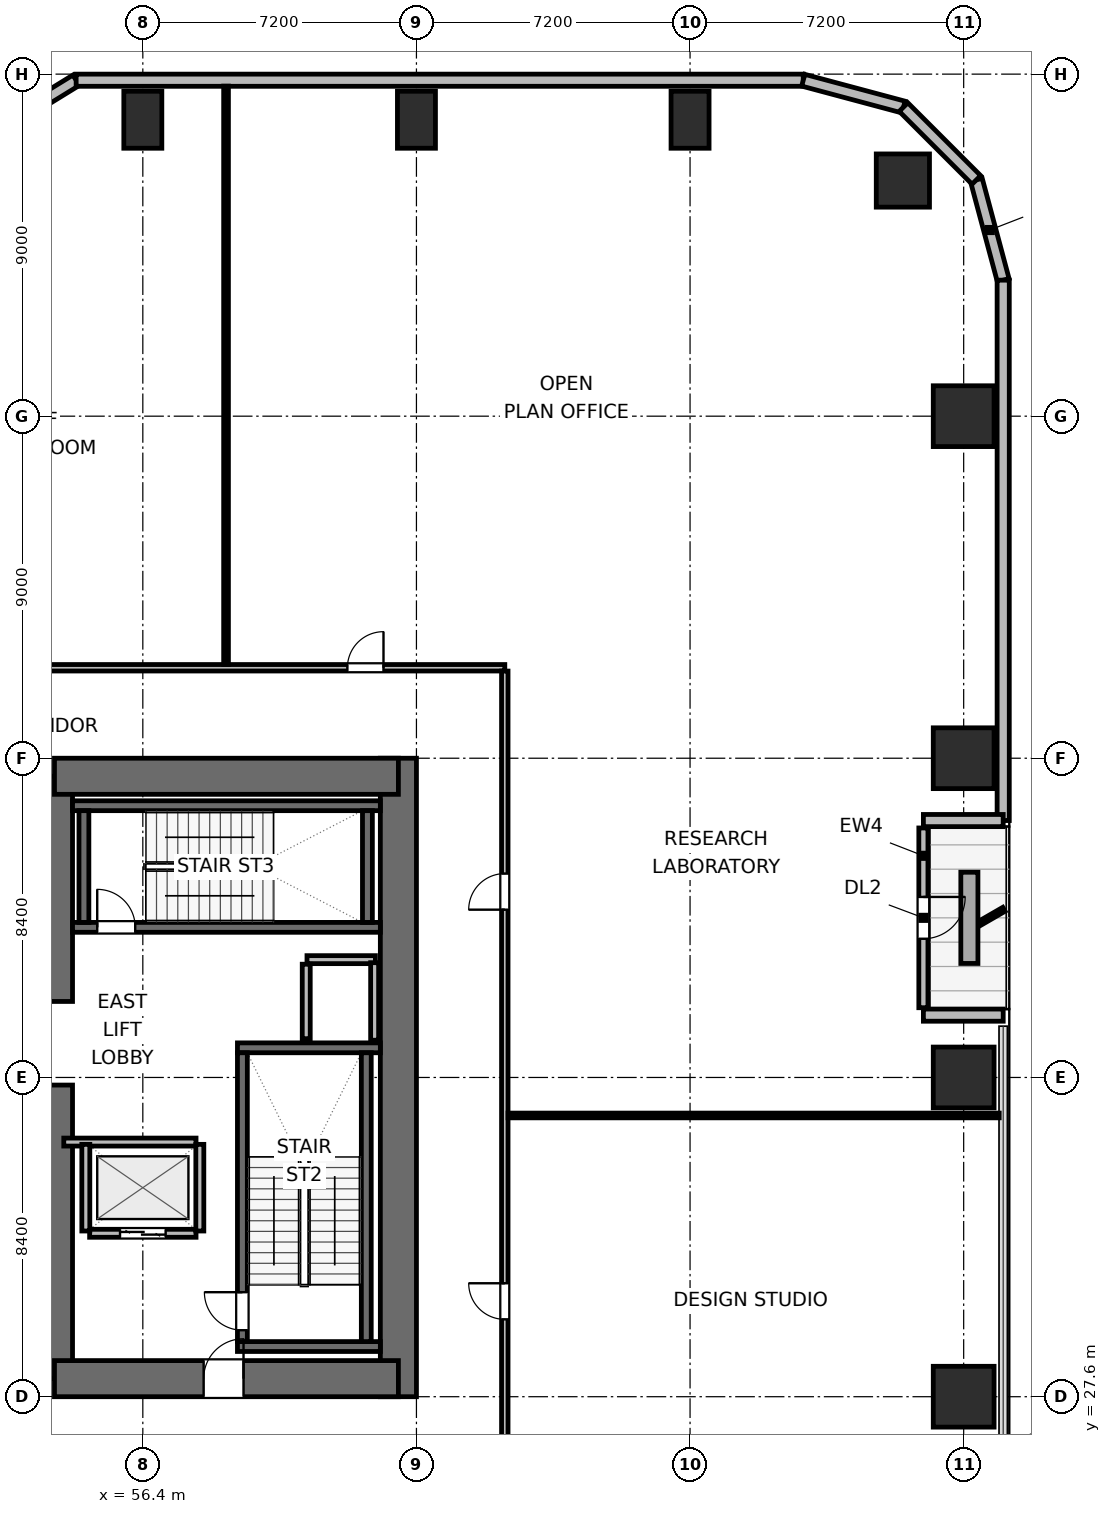
"""IFC4 building model, lengths in metres.
Left out: names, types, materials, properties, quantities, classifications, styles, units other than length and angle.
Written with IfcOpenShell. Run it as: python <this file> out.ifc"""

import sys

from ifc_helpers import new_model, si_unit, direction, frame, frame_2d, origin, origin_2d, place, context, subcontext, project, spatial, rectangle, circle, extrude, element, fill, save


model = new_model("IFC4")
c1 = context("Model", 3, precision=1e-05, world=origin(), true_north=direction((0.0, 1.0)))
c2 = subcontext(c1, "Body", "Model", "MODEL_VIEW")
j1 = project(units=[si_unit("LENGTHUNIT", "METRE"), si_unit("PLANEANGLEUNIT", "RADIAN")], contexts=[c1])
p1 = place(None, origin())
s1 = spatial("IfcSite", under=j1, at=p1, CompositionType="ELEMENT")
p2 = place(p1, origin())
s2 = spatial("IfcBuilding", under=s1, at=p2, CompositionType="ELEMENT")
p3 = place(p2, frame((0.0, 0.0, 68.4)))
s3 = spatial("IfcBuildingStorey", under=s2, at=p3, CompositionType="ELEMENT", Elevation=68.4)
p4 = place(p3, frame((54.075, 28.075, 0.0), z_axis=(0.0, 0.0, 1.0), x_axis=(0.0, 1.0, 0.0)))
e1 = element("IfcWall", 1, at=p4, inside=s3, PredefinedType="SHEAR", context=c2, shape_type="SweptSolid", body=[
    extrude(rectangle(XDim=7.725, YDim=0.95, at=frame_2d((3.863, 0.0))), origin(), (0.0, 0.0, 1.0), 4.5),
])
p5 = place(p3, frame((54.075, 38.0, 0.0), z_axis=(0.0, 0.0, 1.0), x_axis=(0.0, 1.0, 0.0)))
e2 = element("IfcWall", 2, at=p5, inside=s3, PredefinedType="SHEAR", context=c2, shape_type="SweptSolid", body=[
    extrude(rectangle(XDim=5.925, YDim=0.95, at=frame_2d((2.962, 0.0))), origin(), (0.0, 0.0, 1.0), 4.5),
])
p6 = place(p3, frame((63.125, 27.6, 0.0), z_axis=(0.0, 0.0, 1.0), x_axis=(0.0, 1.0, 0.0)))
e3 = element("IfcWall", 3, at=p6, inside=s3, PredefinedType="SHEAR", context=c2, shape_type="SweptSolid", body=[
    extrude(rectangle(XDim=16.8, YDim=0.95, at=frame_2d((8.4, 0.0))), origin(), (0.0, 0.0, 1.0), 4.5),
])
p7 = place(p3, frame((54.075, 28.075, 0.0), z_axis=(0.0, 0.0, 1.0), x_axis=(1.0, 0.0, 0.0)))
e4 = element("IfcWall", 4, at=p7, inside=s3, PredefinedType="SHEAR", context=c2, shape_type="SweptSolid", body=[
    extrude(rectangle(XDim=9.05, YDim=0.95, at=frame_2d((4.525, 0.0))), origin(), (0.0, 0.0, 1.0), 4.5),
])
p8 = place(p7, frame((3.925, 0.0, 0.0)))
e5 = element("IfcOpeningElement", 5, at=p8, cuts=e4, PredefinedType="OPENING", context=c2, shape_type="SweptSolid", body=[
    extrude(rectangle(XDim=1.05, YDim=2.04, at=frame_2d((0.525, 1.02))), frame((0.0, 0.485, 0.0), z_axis=(0.0, -1.0, 0.0), x_axis=(1.0, 0.0, 0.0)), (0.0, 0.0, 1.0), 0.97),
])
p9 = place(p3, frame((54.075, 43.925, 0.0), z_axis=(0.0, 0.0, 1.0), x_axis=(1.0, 0.0, 0.0)))
e6 = element("IfcWall", 6, at=p9, inside=s3, PredefinedType="SHEAR", context=c2, shape_type="SweptSolid", body=[
    extrude(rectangle(XDim=9.05, YDim=0.95, at=frame_2d((4.525, 0.0))), origin(), (0.0, 0.0, 1.0), 4.5),
])
for number, where, z_axis, x_axis in (
    (7, (58.89, 28.92, 0.0), (0.0, 0.0, 1.0), (1.0, 0.0, 0.0)),
    (8, (58.89, 36.78, 0.0), (0.0, 0.0, 1.0), (1.0, 0.0, 0.0)),
):
    element("IfcWall", number, at=place(p3, frame(where, z_axis=z_axis, x_axis=x_axis)), inside=s3, PredefinedType="SHEAR", context=c2, shape_type="SweptSolid", body=[
        extrude(rectangle(XDim=3.76, YDim=0.26, at=frame_2d((1.88, 0.0))), origin(), (0.0, 0.0, 1.0), 4.5),
    ])
p10 = place(p3, frame((59.02, 29.05, 0.0), z_axis=(0.0, 0.0, 1.0), x_axis=(0.0, 1.0, 0.0)))
e9 = element("IfcWall", 9, at=p10, inside=s3, PredefinedType="SHEAR", context=c2, shape_type="SweptSolid", body=[
    extrude(rectangle(XDim=7.6, YDim=0.26, at=frame_2d((3.8, 0.0))), origin(), (0.0, 0.0, 1.0), 4.5),
])
p11 = place(p10, frame((0.3, 0.0, 0.0)))
e10 = element("IfcOpeningElement", 10, at=p11, cuts=e9, PredefinedType="OPENING", context=c2, shape_type="SweptSolid", body=[
    extrude(rectangle(XDim=1.0, YDim=2.04, at=frame_2d((0.5, 1.02))), frame((0.0, 0.14, 0.0), z_axis=(0.0, -1.0, 0.0), x_axis=(1.0, 0.0, 0.0)), (0.0, 0.0, 1.0), 0.28),
])
p12 = place(p3, frame((62.28, 29.05, 0.0), z_axis=(0.0, 0.0, 1.0), x_axis=(0.0, 1.0, 0.0)))
e11 = element("IfcWall", 11, at=p12, inside=s3, PredefinedType="SHEAR", context=c2, shape_type="SweptSolid", body=[
    extrude(rectangle(XDim=7.6, YDim=0.26, at=frame_2d((3.8, 0.0))), origin(), (0.0, 0.0, 1.0), 4.5),
])
p13 = place(p3, frame((54.55, 39.95, 0.0), z_axis=(0.0, 0.0, 1.0), x_axis=(1.0, 0.0, 0.0)))
e12 = element("IfcWall", 12, at=p13, inside=s3, PredefinedType="SHEAR", context=c2, shape_type="SweptSolid", body=[
    extrude(rectangle(XDim=8.1, YDim=0.26, at=frame_2d((4.05, 0.0))), origin(), (0.0, 0.0, 1.0), 4.5),
])
p14 = place(p13, frame((0.65, 0.0, 0.0)))
e13 = element("IfcOpeningElement", 13, at=p14, cuts=e12, PredefinedType="OPENING", context=c2, shape_type="SweptSolid", body=[
    extrude(rectangle(XDim=1.0, YDim=2.04, at=frame_2d((0.5, 1.02))), frame((0.0, 0.14, 0.0), z_axis=(0.0, -1.0, 0.0), x_axis=(1.0, 0.0, 0.0)), (0.0, 0.0, 1.0), 0.28),
])
p15 = place(p3, frame((54.55, 43.15, 0.0), z_axis=(0.0, 0.0, 1.0), x_axis=(1.0, 0.0, 0.0)))
e14 = element("IfcWall", 14, at=p15, inside=s3, PredefinedType="SHEAR", context=c2, shape_type="SweptSolid", body=[
    extrude(rectangle(XDim=8.1, YDim=0.26, at=frame_2d((4.05, 0.0))), origin(), (0.0, 0.0, 1.0), 4.5),
])
for number, where, z_axis, x_axis in (
    (15, (54.85, 40.08, 0.0), (0.0, 0.0, 1.0), (0.0, 1.0, 0.0)),
    (16, (62.31, 40.08, 0.0), (0.0, 0.0, 1.0), (0.0, 1.0, 0.0)),
):
    element("IfcWall", number, at=place(p3, frame(where, z_axis=z_axis, x_axis=x_axis)), inside=s3, PredefinedType="SHEAR", context=c2, shape_type="SweptSolid", body=[
        extrude(rectangle(XDim=2.94, YDim=0.26, at=frame_2d((1.47, 0.0))), origin(), (0.0, 0.0, 1.0), 4.5),
    ])
p16 = place(p3, frame((76.4, 59.6, 0.0), z_axis=(0.0, 0.0, 1.0), x_axis=(1.0, 0.0, 0.0)))
e17 = element("IfcColumn", 17, at=p16, inside=s3, PredefinedType="COLUMN", context=c2, shape_type="SweptSolid", body=[
    extrude(circle(Radius=0.7, at=origin_2d()), origin(), (0.0, 0.0, 1.0), 4.5),
])
for number, where, z_axis, x_axis in (
    (18, (56.4, 61.2, 0.0), (0.0, 0.0, 1.0), (1.0, 0.0, 0.0)),
    (19, (63.6, 61.2, 0.0), (0.0, 0.0, 1.0), (1.0, 0.0, 0.0)),
    (20, (70.8, 61.2, 0.0), (0.0, 0.0, 1.0), (1.0, 0.0, 0.0)),
):
    element("IfcColumn", number, at=place(p3, frame(where, z_axis=z_axis, x_axis=x_axis)), inside=s3, PredefinedType="COLUMN", context=c2, shape_type="SweptSolid", body=[
        extrude(rectangle(XDim=1.0, YDim=1.5, at=origin_2d()), origin(), (0.0, 0.0, 1.0), 4.5),
    ])
for number, where, z_axis, x_axis in (
    (21, (78.0, 27.6, 0.0), (0.0, 0.0, 1.0), (1.0, 0.0, 0.0)),
    (22, (78.0, 36.0, 0.0), (0.0, 0.0, 1.0), (1.0, 0.0, 0.0)),
    (23, (78.0, 44.4, 0.0), (0.0, 0.0, 1.0), (1.0, 0.0, 0.0)),
    (24, (78.0, 53.4, 0.0), (0.0, 0.0, 1.0), (1.0, 0.0, 0.0)),
):
    element("IfcColumn", number, at=place(p3, frame(where, z_axis=z_axis, x_axis=x_axis)), inside=s3, PredefinedType="COLUMN", context=c2, shape_type="SweptSolid", body=[
        extrude(rectangle(XDim=1.6, YDim=1.6, at=origin_2d()), origin(), (0.0, 0.0, 1.0), 4.5),
    ])
p17 = place(p3, frame((78.333, 59.617, 0.0), z_axis=(0.0, 0.0, 1.0), x_axis=(0.25869736047, -0.965958423373, 0.0)))
e25 = element("IfcWall", 25, at=p17, inside=s3, PredefinedType="SOLIDWALL", context=c2, shape_type="SweptSolid", body=[
    extrude(rectangle(XDim=2.731, YDim=0.32, at=frame_2d((1.366, 0.0))), origin(), (0.0, 0.0, 1.0), 4.24),
])
p18 = place(p3, frame((79.04, 56.979, 0.0), z_axis=(0.0, 0.0, 1.0), x_axis=(0.0, -1.0, 0.0)))
e26 = element("IfcWall", 26, at=p18, inside=s3, PredefinedType="SOLIDWALL", context=c2, shape_type="SweptSolid", body=[
    extrude(rectangle(XDim=14.219, YDim=0.32, at=frame_2d((7.109, 0.0))), origin(), (0.0, 0.0, 1.0), 4.24),
])
p19 = place(p3, frame((79.04, 42.76, 0.0), z_axis=(0.0, 0.0, 1.0), x_axis=(-1.0, 0.0, 0.0)))
e27 = element("IfcWall", 27, at=p19, inside=s3, PredefinedType="SOLIDWALL", context=c2, shape_type="SweptSolid", body=[
    extrude(rectangle(XDim=2.1, YDim=0.32, at=frame_2d((1.05, 0.0))), origin(), (0.0, 0.0, 1.0), 3.475),
])
p20 = place(p3, frame((76.94, 42.565, 0.0), z_axis=(0.0, 0.0, 1.0), x_axis=(0.0, -1.0, 0.0)))
e28 = element("IfcWall", 28, at=p20, inside=s3, PredefinedType="SOLIDWALL", context=c2, shape_type="SweptSolid", body=[
    extrude(rectangle(XDim=4.73, YDim=0.24, at=frame_2d((2.365, 0.0))), origin(), (0.0, 0.0, 1.0), 3.762),
])
p21 = place(p20, frame((1.815, 0.0, 0.0)))
e29 = element("IfcOpeningElement", 29, at=p21, cuts=e28, PredefinedType="OPENING", context=c2, shape_type="SweptSolid", body=[
    extrude(rectangle(XDim=1.1, YDim=2.04, at=frame_2d((0.55, 1.02))), frame((0.0, 0.13, 0.0), z_axis=(0.0, -1.0, 0.0), x_axis=(1.0, 0.0, 0.0)), (0.0, 0.0, 1.0), 0.26),
])
p22 = place(p3, frame((76.94, 37.64, 0.0), z_axis=(0.0, 0.0, 1.0), x_axis=(1.0, 0.0, 0.0)))
e30 = element("IfcWall", 30, at=p22, inside=s3, PredefinedType="SOLIDWALL", context=c2, shape_type="SweptSolid", body=[
    extrude(rectangle(XDim=2.1, YDim=0.32, at=frame_2d((1.05, 0.0))), origin(), (0.0, 0.0, 1.0), 3.475),
])
p23 = place(p3, frame((53.56, 61.573, 0.0), z_axis=(0.0, 0.0, 1.0), x_axis=(0.851776724646, 0.523904964045, 0.0)))
e31 = element("IfcWall", 31, at=p23, inside=s3, PredefinedType="SOLIDWALL", context=c2, shape_type="SweptSolid", body=[
    extrude(rectangle(XDim=1.274, YDim=0.32, at=frame_2d((0.637, 0.0))), origin(), (0.0, 0.0, 1.0), 4.24),
])
p24 = place(p3, frame((54.645, 62.24, 0.0), z_axis=(0.0, 0.0, 1.0), x_axis=(1.0, 0.0, 0.0)))
e32 = element("IfcWall", 32, at=p24, inside=s3, PredefinedType="SOLIDWALL", context=c2, shape_type="SweptSolid", body=[
    extrude(rectangle(XDim=19.134, YDim=0.32, at=frame_2d((9.567, 0.0))), origin(), (0.0, 0.0, 1.0), 4.24),
])
p25 = place(p3, frame((73.779, 62.24, 0.0), z_axis=(0.0, 0.0, 1.0), x_axis=(0.965964405026, -0.25867502435, 0.0)))
e33 = element("IfcWall", 33, at=p25, inside=s3, PredefinedType="SOLIDWALL", context=c2, shape_type="SweptSolid", body=[
    extrude(rectangle(XDim=2.731, YDim=0.32, at=frame_2d((1.366, 0.0))), origin(), (0.0, 0.0, 1.0), 4.24),
])
p26 = place(p3, frame((76.417, 61.533, 0.0), z_axis=(0.0, 0.0, 1.0), x_axis=(0.707106781187, -0.707106781187, 0.0)))
e34 = element("IfcWall", 34, at=p26, inside=s3, PredefinedType="SOLIDWALL", context=c2, shape_type="SweptSolid", body=[
    extrude(rectangle(XDim=2.71, YDim=0.32, at=frame_2d((1.355, 0.0))), origin(), (0.0, 0.0, 1.0), 4.24),
])
p27 = place(p3, frame((60.72, 39.1, 0.0), z_axis=(0.0, 0.0, 1.0), x_axis=(1.0, 0.0, 0.0)))
e35 = element("IfcWall", 35, at=p27, inside=s3, PredefinedType="PARTITIONING", context=c2, shape_type="SweptSolid", body=[
    extrude(rectangle(XDim=1.8, YDim=0.21, at=frame_2d((0.9, 0.0))), origin(), (0.0, 0.0, 1.0), 4.24),
])
p28 = place(p3, frame((60.7, 37.02, 0.0), z_axis=(0.0, 0.0, 1.0), x_axis=(0.0, 1.0, 0.0)))
e36 = element("IfcWall", 36, at=p28, inside=s3, PredefinedType="PARTITIONING", context=c2, shape_type="SweptSolid", body=[
    extrude(rectangle(XDim=1.96, YDim=0.21, at=frame_2d((0.98, 0.0))), origin(), (0.0, 0.0, 1.0), 4.24),
])
p29 = place(p3, frame((62.5, 36.98, 0.0), z_axis=(0.0, 0.0, 1.0), x_axis=(0.0, 1.0, 0.0)))
e37 = element("IfcWall", 37, at=p29, inside=s3, PredefinedType="PARTITIONING", context=c2, shape_type="SweptSolid", body=[
    extrude(rectangle(XDim=2.04, YDim=0.21, at=frame_2d((1.02, 0.0))), origin(), (0.0, 0.0, 1.0), 4.24),
])
p30 = place(p3, frame((55.0, 31.9, 0.0), z_axis=(0.0, 0.0, 1.0), x_axis=(1.0, 0.0, 0.0)))
e38 = element("IfcWall", 38, at=p30, inside=s3, PredefinedType="PARTITIONING", context=c2, shape_type="SweptSolid", body=[
    extrude(rectangle(XDim=2.8, YDim=0.21, at=frame_2d((1.4, 0.0))), origin(), (0.0, 0.0, 1.0), 4.24),
])
p31 = place(p30, frame((0.8, 0.0, 0.0)))
e39 = element("IfcOpeningElement", 39, at=p31, cuts=e38, PredefinedType="OPENING", context=c2, shape_type="SweptSolid", body=[
    extrude(rectangle(XDim=1.2, YDim=2.04, at=frame_2d((0.6, 1.02))), frame((0.0, 0.115, 0.0), z_axis=(0.0, -1.0, 0.0), x_axis=(1.0, 0.0, 0.0)), (0.0, 0.0, 1.0), 0.23),
])
p32 = place(p3, frame((54.32, 34.3, 0.0), z_axis=(0.0, 0.0, 1.0), x_axis=(1.0, 0.0, 0.0)))
e40 = element("IfcWall", 40, at=p32, inside=s3, PredefinedType="PARTITIONING", context=c2, shape_type="SweptSolid", body=[
    extrude(rectangle(XDim=3.48, YDim=0.21, at=frame_2d((1.74, 0.0))), origin(), (0.0, 0.0, 1.0), 4.24),
])
for number, where, z_axis, x_axis in (
    (41, (54.9, 31.96, 0.0), (0.0, 0.0, 1.0), (0.0, 1.0, 0.0)),
    (42, (57.9, 31.96, 0.0), (0.0, 0.0, 1.0), (0.0, 1.0, 0.0)),
):
    element("IfcWall", number, at=place(p3, frame(where, z_axis=z_axis, x_axis=x_axis)), inside=s3, PredefinedType="PARTITIONING", context=c2, shape_type="SweptSolid", body=[
        extrude(rectangle(XDim=2.28, YDim=0.21, at=frame_2d((1.14, 0.0))), origin(), (0.0, 0.0, 1.0), 4.24),
    ])
p33 = place(p3, frame((30.075, 46.78, 0.0), z_axis=(0.0, 0.0, 1.0), x_axis=(1.0, 0.0, 0.0)))
e43 = element("IfcWall", 43, at=p33, inside=s3, PredefinedType="PARTITIONING", context=c2, shape_type="SweptSolid", body=[
    extrude(rectangle(XDim=35.85, YDim=0.17, at=frame_2d((17.925, 0.0))), origin(), (0.0, 0.0, 1.0), 4.24),
])
p34 = place(p33, frame((6.263, 0.0, 0.0)))
e44 = element("IfcOpeningElement", 44, at=p34, cuts=e43, PredefinedType="OPENING", context=c2, shape_type="SweptSolid", body=[
    extrude(rectangle(XDim=0.95, YDim=2.04, at=frame_2d((0.475, 1.02))), frame((0.0, 0.095, 0.0), z_axis=(0.0, -1.0, 0.0), x_axis=(1.0, 0.0, 0.0)), (0.0, 0.0, 1.0), 0.19),
])
p35 = place(p33, frame((20.52, 0.0, 0.0)))
e45 = element("IfcOpeningElement", 45, at=p35, cuts=e43, PredefinedType="OPENING", context=c2, shape_type="SweptSolid", body=[
    extrude(rectangle(XDim=0.95, YDim=2.04, at=frame_2d((0.475, 1.02))), frame((0.0, 0.095, 0.0), z_axis=(0.0, -1.0, 0.0), x_axis=(1.0, 0.0, 0.0)), (0.0, 0.0, 1.0), 0.19),
])
p36 = place(p33, frame((31.708, 0.0, 0.0)))
e46 = element("IfcOpeningElement", 46, at=p36, cuts=e43, PredefinedType="OPENING", context=c2, shape_type="SweptSolid", body=[
    extrude(rectangle(XDim=0.95, YDim=2.04, at=frame_2d((0.475, 1.02))), frame((0.0, 0.095, 0.0), z_axis=(0.0, -1.0, 0.0), x_axis=(1.0, 0.0, 0.0)), (0.0, 0.0, 1.0), 0.19),
])
p37 = place(p3, frame((65.925, 25.307, 0.0), z_axis=(0.0, 0.0, 1.0), x_axis=(0.0, 1.0, 0.0)))
e47 = element("IfcWall", 47, at=p37, inside=s3, PredefinedType="PARTITIONING", context=c2, shape_type="SweptSolid", body=[
    extrude(rectangle(XDim=21.386, YDim=0.17, at=frame_2d((10.693, 0.0))), origin(), (0.0, 0.0, 1.0), 4.24),
])
p38 = place(p37, frame((4.328, 0.0, 0.0)))
e48 = element("IfcOpeningElement", 48, at=p38, cuts=e47, PredefinedType="OPENING", context=c2, shape_type="SweptSolid", body=[
    extrude(rectangle(XDim=0.95, YDim=2.04, at=frame_2d((0.475, 1.02))), frame((0.0, 0.095, 0.0), z_axis=(0.0, -1.0, 0.0), x_axis=(1.0, 0.0, 0.0)), (0.0, 0.0, 1.0), 0.19),
])
p39 = place(p37, frame((15.108, 0.0, 0.0)))
e49 = element("IfcOpeningElement", 49, at=p39, cuts=e47, PredefinedType="OPENING", context=c2, shape_type="SweptSolid", body=[
    extrude(rectangle(XDim=0.95, YDim=2.04, at=frame_2d((0.475, 1.02))), frame((0.0, 0.095, 0.0), z_axis=(0.0, -1.0, 0.0), x_axis=(1.0, 0.0, 0.0)), (0.0, 0.0, 1.0), 0.19),
])
p40 = place(p3, frame((58.59, 46.867, 0.0), z_axis=(0.0, 0.0, 1.0), x_axis=(0.0, 1.0, 0.0)))
e50 = element("IfcWall", 50, at=p40, inside=s3, PredefinedType="PARTITIONING", context=c2, shape_type="SweptSolid", body=[
    extrude(rectangle(XDim=15.218, YDim=0.125, at=frame_2d((7.609, 0.0))), origin(), (0.0, 0.0, 1.0), 4.24),
])
p41 = place(p3, frame((66.012, 35.0, 0.0), z_axis=(0.0, 0.0, 1.0), x_axis=(1.0, 0.0, 0.0)))
e51 = element("IfcWall", 51, at=p41, inside=s3, PredefinedType="PARTITIONING", context=c2, shape_type="SweptSolid", body=[
    extrude(rectangle(XDim=12.923, YDim=0.125, at=frame_2d((6.461, 0.0))), origin(), (0.0, 0.0, 1.0), 4.24),
])
p42 = place(p21, origin())
e52 = element("IfcDoor", 52, at=p42, inside=s3, OperationType="SINGLE_SWING_LEFT", PredefinedType="DOOR", context=c2, shape_type="SweptSolid", body=[
    extrude(rectangle(XDim=1.1, YDim=2.04, at=frame_2d((0.55, 1.02))), frame((0.0, 0.025, 0.0), z_axis=(0.0, -1.0, 0.0), x_axis=(1.0, 0.0, 0.0)), (0.0, 0.0, 1.0), 0.05),
])
fill(e29, e52)
p43 = place(p11, origin())
e53 = element("IfcDoor", 53, at=p43, inside=s3, OperationType="SINGLE_SWING_RIGHT", PredefinedType="DOOR", context=c2, shape_type="SweptSolid", body=[
    extrude(rectangle(XDim=1.0, YDim=2.04, at=frame_2d((0.5, 1.02))), frame((0.0, 0.025, 0.0), z_axis=(0.0, -1.0, 0.0), x_axis=(1.0, 0.0, 0.0)), (0.0, 0.0, 1.0), 0.05),
])
fill(e10, e53)
p44 = place(p14, origin())
e54 = element("IfcDoor", 54, at=p44, inside=s3, OperationType="SINGLE_SWING_LEFT", PredefinedType="DOOR", context=c2, shape_type="SweptSolid", body=[
    extrude(rectangle(XDim=1.0, YDim=2.04, at=frame_2d((0.5, 1.02))), frame((0.0, 0.025, 0.0), z_axis=(0.0, -1.0, 0.0), x_axis=(1.0, 0.0, 0.0)), (0.0, 0.0, 1.0), 0.05),
])
fill(e13, e54)
p45 = place(p31, origin())
e55 = element("IfcDoor", 55, at=p45, inside=s3, OperationType="DOUBLE_DOOR_SLIDING", PredefinedType="DOOR", context=c2, shape_type="SweptSolid", body=[
    extrude(rectangle(XDim=1.2, YDim=2.04, at=frame_2d((0.6, 1.02))), frame((0.0, 0.025, 0.0), z_axis=(0.0, -1.0, 0.0), x_axis=(1.0, 0.0, 0.0)), (0.0, 0.0, 1.0), 0.05),
])
fill(e39, e55)
p46 = place(p8, origin())
e56 = element("IfcDoor", 56, at=p46, inside=s3, OperationType="SINGLE_SWING_RIGHT", PredefinedType="DOOR", context=c2, shape_type="SweptSolid", body=[
    extrude(rectangle(XDim=1.05, YDim=2.04, at=frame_2d((0.525, 1.02))), frame((0.0, 0.025, 0.0), z_axis=(0.0, -1.0, 0.0), x_axis=(1.0, 0.0, 0.0)), (0.0, 0.0, 1.0), 0.05),
])
fill(e5, e56)
p47 = place(p36, origin())
e57 = element("IfcDoor", 57, at=p47, inside=s3, OperationType="SINGLE_SWING_RIGHT", PredefinedType="DOOR", context=c2, shape_type="SweptSolid", body=[
    extrude(rectangle(XDim=0.95, YDim=2.04, at=frame_2d((0.475, 1.02))), frame((0.0, 0.025, 0.0), z_axis=(0.0, -1.0, 0.0), x_axis=(1.0, 0.0, 0.0)), (0.0, 0.0, 1.0), 0.05),
])
fill(e46, e57)
p48 = place(p38, origin())
e58 = element("IfcDoor", 58, at=p48, inside=s3, OperationType="SINGLE_SWING_RIGHT", PredefinedType="DOOR", context=c2, shape_type="SweptSolid", body=[
    extrude(rectangle(XDim=0.95, YDim=2.04, at=frame_2d((0.475, 1.02))), frame((0.0, 0.025, 0.0), z_axis=(0.0, -1.0, 0.0), x_axis=(1.0, 0.0, 0.0)), (0.0, 0.0, 1.0), 0.05),
])
fill(e48, e58)
p49 = place(p39, origin())
e59 = element("IfcDoor", 59, at=p49, inside=s3, OperationType="SINGLE_SWING_LEFT", PredefinedType="DOOR", context=c2, shape_type="SweptSolid", body=[
    extrude(rectangle(XDim=0.95, YDim=2.04, at=frame_2d((0.475, 1.02))), frame((0.0, 0.025, 0.0), z_axis=(0.0, -1.0, 0.0), x_axis=(1.0, 0.0, 0.0)), (0.0, 0.0, 1.0), 0.05),
])
fill(e49, e59)
save(model, sys.argv[1])
